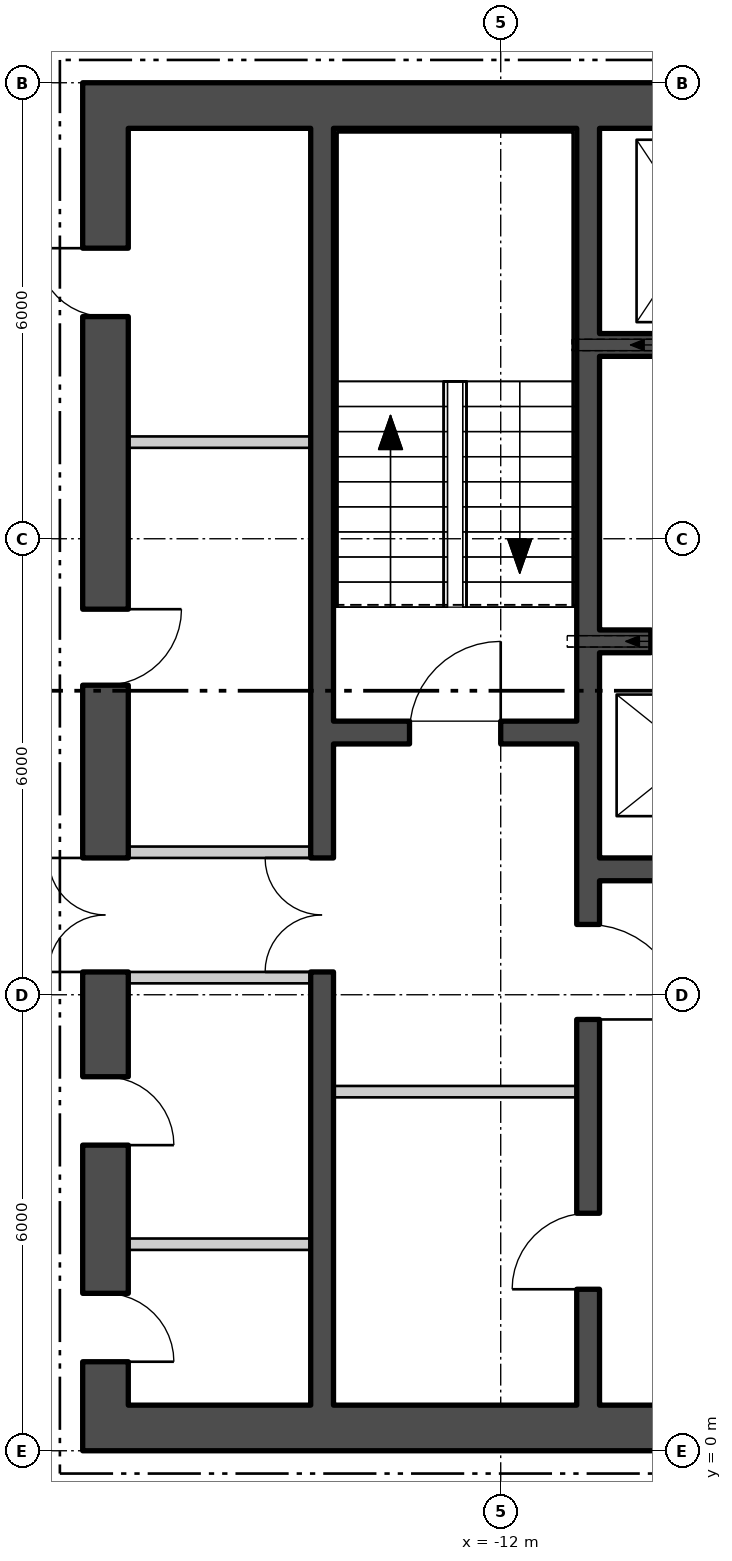
"""IFC4 building model, lengths in metres.
Left out: names, types, materials, properties, quantities, classifications, styles, units other than length and angle.
Written with IfcOpenShell. Run it as: python <this file> out.ifc"""

import sys

from ifc_helpers import new_model, si_unit, direction, frame, frame_2d, origin, place, context, subcontext, project, spatial, polyline, rectangle, outline, extrude, element, fill, save


model = new_model("IFC4")
c1 = context("Model", 3, precision=1e-05, world=origin(), true_north=direction((0.0, 1.0)))
c2 = subcontext(c1, "Body", "Model", "MODEL_VIEW")
j1 = project(units=[si_unit("LENGTHUNIT", "METRE"), si_unit("PLANEANGLEUNIT", "RADIAN")], contexts=[c1])
p1 = place(None, origin())
s1 = spatial("IfcSite", under=j1, at=p1, CompositionType="ELEMENT")
p2 = place(p1, origin())
s2 = spatial("IfcBuilding", under=s1, at=p2, CompositionType="ELEMENT")
p3 = place(p2, frame((0.0, 0.0, 78.3)))
s3 = spatial("IfcBuildingStorey", under=s2, at=p3, CompositionType="ELEMENT", Elevation=78.3)
p4 = place(p3, frame((-28.09, 10.934, -0.18), z_axis=(0.0, 0.0, 1.0), x_axis=(0.500000711659, -0.866024992908, 0.0)))
e1 = element("IfcWall", 1, at=p4, inside=s3, PredefinedType="SOLIDWALL", context=c2, shape_type="SweptSolid", body=[
    extrude(outline(polyline([(-0.13, -0.225), (45.87, -0.225), (45.61, 0.225), (0.13, 0.225), (-0.13, -0.225)])), origin(), (0.0, 0.0, 1.0), 6.0),
])
p5 = place(p4, frame((1.424, 0.0, 1.38)))
e2 = element("IfcOpeningElement", 2, at=p5, cuts=e1, PredefinedType="OPENING", context=c2, shape_type="SweptSolid", body=[
    extrude(rectangle(XDim=2.4, YDim=3.6, at=frame_2d((1.2, 1.8))), frame((0.0, 0.235, 0.0), z_axis=(0.0, -1.0, 0.0), x_axis=(1.0, 0.0, 0.0)), (0.0, 0.0, 1.0), 0.47),
])
p6 = place(p4, frame((5.893, 0.0, 1.38)))
e3 = element("IfcOpeningElement", 3, at=p6, cuts=e1, PredefinedType="OPENING", context=c2, shape_type="SweptSolid", body=[
    extrude(rectangle(XDim=2.4, YDim=3.6, at=frame_2d((1.2, 1.8))), frame((0.0, 0.235, 0.0), z_axis=(0.0, -1.0, 0.0), x_axis=(1.0, 0.0, 0.0)), (0.0, 0.0, 1.0), 0.47),
])
p7 = place(p4, frame((10.401, 0.0, 1.38)))
e4 = element("IfcOpeningElement", 4, at=p7, cuts=e1, PredefinedType="OPENING", context=c2, shape_type="SweptSolid", body=[
    extrude(rectangle(XDim=2.4, YDim=3.6, at=frame_2d((1.2, 1.8))), frame((0.0, 0.235, 0.0), z_axis=(0.0, -1.0, 0.0), x_axis=(1.0, 0.0, 0.0)), (0.0, 0.0, 1.0), 0.47),
])
p8 = place(p4, frame((14.909, 0.0, 1.38)))
e5 = element("IfcOpeningElement", 5, at=p8, cuts=e1, PredefinedType="OPENING", context=c2, shape_type="SweptSolid", body=[
    extrude(rectangle(XDim=2.4, YDim=3.6, at=frame_2d((1.2, 1.8))), frame((0.0, 0.235, 0.0), z_axis=(0.0, -1.0, 0.0), x_axis=(1.0, 0.0, 0.0)), (0.0, 0.0, 1.0), 0.47),
])
p9 = place(p4, frame((19.416, 0.0, 1.38)))
e6 = element("IfcOpeningElement", 6, at=p9, cuts=e1, PredefinedType="OPENING", context=c2, shape_type="SweptSolid", body=[
    extrude(rectangle(XDim=2.4, YDim=3.6, at=frame_2d((1.2, 1.8))), frame((0.0, 0.235, 0.0), z_axis=(0.0, -1.0, 0.0), x_axis=(1.0, 0.0, 0.0)), (0.0, 0.0, 1.0), 0.47),
])
p10 = place(p4, frame((23.924, 0.0, 1.38)))
e7 = element("IfcOpeningElement", 7, at=p10, cuts=e1, PredefinedType="OPENING", context=c2, shape_type="SweptSolid", body=[
    extrude(rectangle(XDim=2.4, YDim=3.6, at=frame_2d((1.2, 1.8))), frame((0.0, 0.235, 0.0), z_axis=(0.0, -1.0, 0.0), x_axis=(1.0, 0.0, 0.0)), (0.0, 0.0, 1.0), 0.47),
])
p11 = place(p4, frame((28.431, 0.0, 1.38)))
e8 = element("IfcOpeningElement", 8, at=p11, cuts=e1, PredefinedType="OPENING", context=c2, shape_type="SweptSolid", body=[
    extrude(rectangle(XDim=2.4, YDim=3.6, at=frame_2d((1.2, 1.8))), frame((0.0, 0.235, 0.0), z_axis=(0.0, -1.0, 0.0), x_axis=(1.0, 0.0, 0.0)), (0.0, 0.0, 1.0), 0.47),
])
p12 = place(p4, frame((32.939, 0.0, 1.38)))
e9 = element("IfcOpeningElement", 9, at=p12, cuts=e1, PredefinedType="OPENING", context=c2, shape_type="SweptSolid", body=[
    extrude(rectangle(XDim=2.4, YDim=3.6, at=frame_2d((1.2, 1.8))), frame((0.0, 0.235, 0.0), z_axis=(0.0, -1.0, 0.0), x_axis=(1.0, 0.0, 0.0)), (0.0, 0.0, 1.0), 0.47),
])
p13 = place(p4, frame((37.447, 0.0, 1.38)))
e10 = element("IfcOpeningElement", 10, at=p13, cuts=e1, PredefinedType="OPENING", context=c2, shape_type="SweptSolid", body=[
    extrude(rectangle(XDim=2.4, YDim=3.6, at=frame_2d((1.2, 1.8))), frame((0.0, 0.235, 0.0), z_axis=(0.0, -1.0, 0.0), x_axis=(1.0, 0.0, 0.0)), (0.0, 0.0, 1.0), 0.47),
])
p14 = place(p4, frame((41.916, 0.0, 1.38)))
e11 = element("IfcOpeningElement", 11, at=p14, cuts=e1, PredefinedType="OPENING", context=c2, shape_type="SweptSolid", body=[
    extrude(rectangle(XDim=2.4, YDim=3.6, at=frame_2d((1.2, 1.8))), frame((0.0, 0.235, 0.0), z_axis=(0.0, -1.0, 0.0), x_axis=(1.0, 0.0, 0.0)), (0.0, 0.0, 1.0), 0.47),
])
p15 = place(p3, frame((-17.5, 0.3, 0.0), z_axis=(0.0, 0.0, 1.0), x_axis=(1.0, 0.0, 0.0)))
e12 = element("IfcWall", 12, at=p15, inside=s3, PredefinedType="SHEAR", context=c2, shape_type="SweptSolid", body=[
    extrude(rectangle(XDim=35.0, YDim=0.6, at=frame_2d((17.5, 0.0))), origin(), (0.0, 0.0, 1.0), 5.8),
])
p16 = place(p15, frame((12.0, 0.0, 0.0)))
e13 = element("IfcOpeningElement", 13, at=p16, cuts=e12, PredefinedType="OPENING", context=c2, shape_type="SweptSolid", body=[
    extrude(rectangle(XDim=1.8, YDim=2.4, at=frame_2d((0.9, 1.2))), frame((0.0, 0.31, 0.0), z_axis=(0.0, -1.0, 0.0), x_axis=(1.0, 0.0, 0.0)), (0.0, 0.0, 1.0), 0.62),
])
p17 = place(p15, frame((22.0, 0.0, 0.0)))
e14 = element("IfcOpeningElement", 14, at=p17, cuts=e12, PredefinedType="OPENING", context=c2, shape_type="SweptSolid", body=[
    extrude(rectangle(XDim=1.8, YDim=2.4, at=frame_2d((0.9, 1.2))), frame((0.0, 0.31, 0.0), z_axis=(0.0, -1.0, 0.0), x_axis=(1.0, 0.0, 0.0)), (0.0, 0.0, 1.0), 0.62),
])
p18 = place(p3, frame((-17.5, 17.7, 0.0), z_axis=(0.0, 0.0, 1.0), x_axis=(1.0, 0.0, 0.0)))
e15 = element("IfcWall", 15, at=p18, inside=s3, PredefinedType="SHEAR", context=c2, shape_type="SweptSolid", body=[
    extrude(rectangle(XDim=35.0, YDim=0.6, at=frame_2d((17.5, 0.0))), origin(), (0.0, 0.0, 1.0), 5.8),
])
p19 = place(p3, frame((-17.2, 0.6, 0.0), z_axis=(0.0, 0.0, 1.0), x_axis=(0.0, 1.0, 0.0)))
e16 = element("IfcWall", 16, at=p19, inside=s3, PredefinedType="SHEAR", context=c2, shape_type="SweptSolid", body=[
    extrude(rectangle(XDim=16.8, YDim=0.6, at=frame_2d((8.4, 0.0))), origin(), (0.0, 0.0, 1.0), 5.8),
])
p20 = place(p19, frame((5.7, 0.0, 0.0)))
e17 = element("IfcOpeningElement", 17, at=p20, cuts=e16, PredefinedType="OPENING", context=c2, shape_type="SweptSolid", body=[
    extrude(rectangle(XDim=1.5, YDim=2.1, at=frame_2d((0.75, 1.05))), frame((0.0, 0.31, 0.0), z_axis=(0.0, -1.0, 0.0), x_axis=(1.0, 0.0, 0.0)), (0.0, 0.0, 1.0), 0.62),
])
p21 = place(p19, frame((0.571, 0.0, 0.0)))
e18 = element("IfcOpeningElement", 18, at=p21, cuts=e16, PredefinedType="OPENING", context=c2, shape_type="SweptSolid", body=[
    extrude(rectangle(XDim=0.9, YDim=2.1, at=frame_2d((0.45, 1.05))), frame((0.0, 0.31, 0.0), z_axis=(0.0, -1.0, 0.0), x_axis=(1.0, 0.0, 0.0)), (0.0, 0.0, 1.0), 0.62),
])
p22 = place(p19, frame((3.421, 0.0, 0.0)))
e19 = element("IfcOpeningElement", 19, at=p22, cuts=e16, PredefinedType="OPENING", context=c2, shape_type="SweptSolid", body=[
    extrude(rectangle(XDim=0.9, YDim=2.1, at=frame_2d((0.45, 1.05))), frame((0.0, 0.31, 0.0), z_axis=(0.0, -1.0, 0.0), x_axis=(1.0, 0.0, 0.0)), (0.0, 0.0, 1.0), 0.62),
])
p23 = place(p19, frame((9.473, 0.0, 0.0)))
e20 = element("IfcOpeningElement", 20, at=p23, cuts=e16, PredefinedType="OPENING", context=c2, shape_type="SweptSolid", body=[
    extrude(rectangle(XDim=1.0, YDim=2.1, at=frame_2d((0.5, 1.05))), frame((0.0, 0.31, 0.0), z_axis=(0.0, -1.0, 0.0), x_axis=(1.0, 0.0, 0.0)), (0.0, 0.0, 1.0), 0.62),
])
p24 = place(p19, frame((14.323, 0.0, 0.0)))
e21 = element("IfcOpeningElement", 21, at=p24, cuts=e16, PredefinedType="OPENING", context=c2, shape_type="SweptSolid", body=[
    extrude(rectangle(XDim=0.9, YDim=2.1, at=frame_2d((0.45, 1.05))), frame((0.0, 0.31, 0.0), z_axis=(0.0, -1.0, 0.0), x_axis=(1.0, 0.0, 0.0)), (0.0, 0.0, 1.0), 0.62),
])
p25 = place(p3, frame((-10.85, 0.6, 0.0), z_axis=(0.0, 0.0, 1.0), x_axis=(0.0, 1.0, 0.0)))
e22 = element("IfcWall", 22, at=p25, inside=s3, PredefinedType="SHEAR", context=c2, shape_type="SweptSolid", body=[
    extrude(rectangle(XDim=16.8, YDim=0.3, at=frame_2d((8.4, 0.0))), origin(), (0.0, 0.0, 1.0), 5.8),
])
p26 = place(p25, frame((5.075, 0.0, 0.0)))
e23 = element("IfcOpeningElement", 23, at=p26, cuts=e22, PredefinedType="OPENING", context=c2, shape_type="SweptSolid", body=[
    extrude(rectangle(XDim=1.25, YDim=2.1, at=frame_2d((0.625, 1.05))), frame((0.0, 0.16, 0.0), z_axis=(0.0, -1.0, 0.0), x_axis=(1.0, 0.0, 0.0)), (0.0, 0.0, 1.0), 0.32),
])
p27 = place(p25, frame((1.525, 0.0, 0.0)))
e24 = element("IfcOpeningElement", 24, at=p27, cuts=e22, PredefinedType="OPENING", context=c2, shape_type="SweptSolid", body=[
    extrude(rectangle(XDim=1.0, YDim=2.1, at=frame_2d((0.5, 1.05))), frame((0.0, 0.16, 0.0), z_axis=(0.0, -1.0, 0.0), x_axis=(1.0, 0.0, 0.0)), (0.0, 0.0, 1.0), 0.32),
])
p28 = place(p3, frame((-14.35, 0.6, 0.0), z_axis=(0.0, 0.0, 1.0), x_axis=(0.0, 1.0, 0.0)))
e25 = element("IfcWall", 25, at=p28, inside=s3, PredefinedType="SHEAR", context=c2, shape_type="SweptSolid", body=[
    extrude(rectangle(XDim=16.8, YDim=0.3, at=frame_2d((8.4, 0.0))), origin(), (0.0, 0.0, 1.0), 5.8),
])
p29 = place(p28, frame((5.7, 0.0, 0.0)))
e26 = element("IfcOpeningElement", 26, at=p29, cuts=e25, PredefinedType="OPENING", context=c2, shape_type="SweptSolid", body=[
    extrude(rectangle(XDim=1.5, YDim=2.1, at=frame_2d((0.75, 1.05))), frame((0.0, 0.16, 0.0), z_axis=(0.0, -1.0, 0.0), x_axis=(1.0, 0.0, 0.0)), (0.0, 0.0, 1.0), 0.32),
])
p30 = place(p3, frame((-14.2, 9.45, 0.0), z_axis=(0.0, 0.0, 1.0), x_axis=(1.0, 0.0, 0.0)))
e27 = element("IfcWall", 27, at=p30, inside=s3, PredefinedType="SHEAR", context=c2, shape_type="SweptSolid", body=[
    extrude(rectangle(XDim=3.2, YDim=0.3, at=frame_2d((1.6, 0.0))), origin(), (0.0, 0.0, 1.0), 5.8),
])
p31 = place(p30, frame((1.0, 0.0, 0.0)))
e28 = element("IfcOpeningElement", 28, at=p31, cuts=e27, PredefinedType="OPENING", context=c2, shape_type="SweptSolid", body=[
    extrude(rectangle(XDim=1.2, YDim=2.1, at=frame_2d((0.6, 1.05))), frame((0.0, 0.16, 0.0), z_axis=(0.0, -1.0, 0.0), x_axis=(1.0, 0.0, 0.0)), (0.0, 0.0, 1.0), 0.32),
])
p32 = place(p3, frame((-10.7, 14.55, 0.0), z_axis=(0.0, 0.0, 1.0), x_axis=(1.0, 0.0, 0.0)))
e29 = element("IfcWall", 29, at=p32, inside=s3, PredefinedType="SHEAR", context=c2, shape_type="SweptSolid", body=[
    extrude(rectangle(XDim=21.4, YDim=0.3, at=frame_2d((10.7, 0.0))), origin(), (0.0, 0.0, 1.0), 5.8),
])
p33 = place(p32, frame((0.738, 0.0, 0.0)))
e30 = element("IfcOpeningElement", 30, at=p33, cuts=e29, PredefinedType="OPENING", context=c2, shape_type="SweptSolid", body=[
    extrude(rectangle(XDim=1.1, YDim=2.1, at=frame_2d((0.55, 1.05))), frame((0.0, 0.16, 0.0), z_axis=(0.0, -1.0, 0.0), x_axis=(1.0, 0.0, 0.0)), (0.0, 0.0, 1.0), 0.32),
])
p34 = place(p32, frame((3.462, 0.0, 0.0)))
e31 = element("IfcOpeningElement", 31, at=p34, cuts=e29, PredefinedType="OPENING", context=c2, shape_type="SweptSolid", body=[
    extrude(rectangle(XDim=1.1, YDim=2.1, at=frame_2d((0.55, 1.05))), frame((0.0, 0.16, 0.0), z_axis=(0.0, -1.0, 0.0), x_axis=(1.0, 0.0, 0.0)), (0.0, 0.0, 1.0), 0.32),
])
p35 = place(p32, frame((6.138, 0.0, 0.0)))
e32 = element("IfcOpeningElement", 32, at=p35, cuts=e29, PredefinedType="OPENING", context=c2, shape_type="SweptSolid", body=[
    extrude(rectangle(XDim=1.1, YDim=2.1, at=frame_2d((0.55, 1.05))), frame((0.0, 0.16, 0.0), z_axis=(0.0, -1.0, 0.0), x_axis=(1.0, 0.0, 0.0)), (0.0, 0.0, 1.0), 0.32),
])
p36 = place(p32, frame((8.812, 0.0, 0.0)))
e33 = element("IfcOpeningElement", 33, at=p36, cuts=e29, PredefinedType="OPENING", context=c2, shape_type="SweptSolid", body=[
    extrude(rectangle(XDim=1.1, YDim=2.1, at=frame_2d((0.55, 1.05))), frame((0.0, 0.16, 0.0), z_axis=(0.0, -1.0, 0.0), x_axis=(1.0, 0.0, 0.0)), (0.0, 0.0, 1.0), 0.32),
])
p37 = place(p32, frame((14.162, 0.0, 0.0)))
e34 = element("IfcOpeningElement", 34, at=p37, cuts=e29, PredefinedType="OPENING", context=c2, shape_type="SweptSolid", body=[
    extrude(rectangle(XDim=1.1, YDim=2.1, at=frame_2d((0.55, 1.05))), frame((0.0, 0.16, 0.0), z_axis=(0.0, -1.0, 0.0), x_axis=(1.0, 0.0, 0.0)), (0.0, 0.0, 1.0), 0.32),
])
p38 = place(p32, frame((16.837, 0.0, 0.0)))
e35 = element("IfcOpeningElement", 35, at=p38, cuts=e29, PredefinedType="OPENING", context=c2, shape_type="SweptSolid", body=[
    extrude(rectangle(XDim=1.1, YDim=2.1, at=frame_2d((0.55, 1.05))), frame((0.0, 0.16, 0.0), z_axis=(0.0, -1.0, 0.0), x_axis=(1.0, 0.0, 0.0)), (0.0, 0.0, 1.0), 0.32),
])
p39 = place(p32, frame((19.562, 0.0, 0.0)))
e36 = element("IfcOpeningElement", 36, at=p39, cuts=e29, PredefinedType="OPENING", context=c2, shape_type="SweptSolid", body=[
    extrude(rectangle(XDim=1.1, YDim=2.1, at=frame_2d((0.55, 1.05))), frame((0.0, 0.16, 0.0), z_axis=(0.0, -1.0, 0.0), x_axis=(1.0, 0.0, 0.0)), (0.0, 0.0, 1.0), 0.32),
])
p40 = place(p3, frame((-10.7, 10.65, 0.0), z_axis=(0.0, 0.0, 1.0), x_axis=(1.0, 0.0, 0.0)))
e37 = element("IfcWall", 37, at=p40, inside=s3, PredefinedType="SHEAR", context=c2, shape_type="SweptSolid", body=[
    extrude(rectangle(XDim=10.3, YDim=0.3, at=frame_2d((5.15, 0.0))), origin(), (0.0, 0.0, 1.0), 5.8),
])
p41 = place(p40, frame((0.675, 0.0, 0.0)))
e38 = element("IfcOpeningElement", 38, at=p41, cuts=e37, PredefinedType="OPENING", context=c2, shape_type="SweptSolid", body=[
    extrude(rectangle(XDim=1.1, YDim=2.1, at=frame_2d((0.55, 1.05))), frame((0.0, 0.16, 0.0), z_axis=(0.0, -1.0, 0.0), x_axis=(1.0, 0.0, 0.0)), (0.0, 0.0, 1.0), 0.32),
])
p42 = place(p40, frame((3.275, 0.0, 0.0)))
e39 = element("IfcOpeningElement", 39, at=p42, cuts=e37, PredefinedType="OPENING", context=c2, shape_type="SweptSolid", body=[
    extrude(rectangle(XDim=1.1, YDim=2.1, at=frame_2d((0.55, 1.05))), frame((0.0, 0.16, 0.0), z_axis=(0.0, -1.0, 0.0), x_axis=(1.0, 0.0, 0.0)), (0.0, 0.0, 1.0), 0.32),
])
p43 = place(p40, frame((5.825, 0.0, 0.0)))
e40 = element("IfcOpeningElement", 40, at=p43, cuts=e37, PredefinedType="OPENING", context=c2, shape_type="SweptSolid", body=[
    extrude(rectangle(XDim=1.1, YDim=2.1, at=frame_2d((0.55, 1.05))), frame((0.0, 0.16, 0.0), z_axis=(0.0, -1.0, 0.0), x_axis=(1.0, 0.0, 0.0)), (0.0, 0.0, 1.0), 0.32),
])
p44 = place(p40, frame((8.375, 0.0, 0.0)))
e41 = element("IfcOpeningElement", 41, at=p44, cuts=e37, PredefinedType="OPENING", context=c2, shape_type="SweptSolid", body=[
    extrude(rectangle(XDim=1.1, YDim=2.1, at=frame_2d((0.55, 1.05))), frame((0.0, 0.16, 0.0), z_axis=(0.0, -1.0, 0.0), x_axis=(1.0, 0.0, 0.0)), (0.0, 0.0, 1.0), 0.32),
])
p45 = place(p3, frame((-10.7, 7.65, 0.0), z_axis=(0.0, 0.0, 1.0), x_axis=(1.0, 0.0, 0.0)))
e42 = element("IfcWall", 42, at=p45, inside=s3, PredefinedType="SHEAR", context=c2, shape_type="SweptSolid", body=[
    extrude(rectangle(XDim=10.3, YDim=0.3, at=frame_2d((5.15, 0.0))), origin(), (0.0, 0.0, 1.0), 5.8),
])
p46 = place(p3, frame((-14.2, 4.725, 0.0), z_axis=(0.0, 0.0, 1.0), x_axis=(1.0, 0.0, 0.0)))
e43 = element("IfcWall", 43, at=p46, inside=s3, PredefinedType="PARTITIONING", context=c2, shape_type="SweptSolid", body=[
    extrude(rectangle(XDim=3.2, YDim=0.15, at=frame_2d((1.6, 0.0))), origin(), (0.0, 0.0, 1.0), 5.8),
])
for number, where, z_axis, x_axis in (
    (44, (-16.9, 6.225, 0.0), (0.0, 0.0, 1.0), (1.0, 0.0, 0.0)),
    (45, (-16.9, 7.875, 0.0), (0.0, 0.0, 1.0), (1.0, 0.0, 0.0)),
    (46, (-16.9, 2.718, 0.0), (0.0, 0.0, 1.0), (1.0, 0.0, 0.0)),
    (47, (-16.9, 13.271, 0.0), (0.0, 0.0, 1.0), (1.0, 0.0, 0.0)),
):
    element("IfcWall", number, at=place(p3, frame(where, z_axis=z_axis, x_axis=x_axis)), inside=s3, PredefinedType="PARTITIONING", context=c2, shape_type="SweptSolid", body=[
        extrude(rectangle(XDim=2.4, YDim=0.15, at=frame_2d((1.2, 0.0))), origin(), (0.0, 0.0, 1.0), 5.8),
    ])
p47 = place(p41, origin())
e48 = element("IfcDoor", 48, at=p47, inside=s3, OperationType="SLIDING_TO_LEFT", PredefinedType="DOOR", context=c2, shape_type="SweptSolid", body=[
    extrude(rectangle(XDim=1.1, YDim=2.1, at=frame_2d((0.55, 1.05))), frame((0.0, 0.025, 0.0), z_axis=(0.0, -1.0, 0.0), x_axis=(1.0, 0.0, 0.0)), (0.0, 0.0, 1.0), 0.05),
])
fill(e38, e48)
p48 = place(p31, origin())
e49 = element("IfcDoor", 49, at=p48, inside=s3, OperationType="SINGLE_SWING_LEFT", PredefinedType="DOOR", context=c2, shape_type="SweptSolid", body=[
    extrude(rectangle(XDim=1.2, YDim=2.1, at=frame_2d((0.6, 1.05))), frame((0.0, 0.025, 0.0), z_axis=(0.0, -1.0, 0.0), x_axis=(1.0, 0.0, 0.0)), (0.0, 0.0, 1.0), 0.05),
])
fill(e28, e49)
p49 = place(p26, origin())
e50 = element("IfcDoor", 50, at=p49, inside=s3, OperationType="SINGLE_SWING_LEFT", PredefinedType="DOOR", context=c2, shape_type="SweptSolid", body=[
    extrude(rectangle(XDim=1.25, YDim=2.1, at=frame_2d((0.625, 1.05))), frame((0.0, 0.025, 0.0), z_axis=(0.0, -1.0, 0.0), x_axis=(1.0, 0.0, 0.0)), (0.0, 0.0, 1.0), 0.05),
])
fill(e23, e50)
p50 = place(p27, origin())
e51 = element("IfcDoor", 51, at=p50, inside=s3, OperationType="SINGLE_SWING_RIGHT", PredefinedType="DOOR", context=c2, shape_type="SweptSolid", body=[
    extrude(rectangle(XDim=1.0, YDim=2.1, at=frame_2d((0.5, 1.05))), frame((0.0, 0.025, 0.0), z_axis=(0.0, -1.0, 0.0), x_axis=(1.0, 0.0, 0.0)), (0.0, 0.0, 1.0), 0.05),
])
fill(e24, e51)
p51 = place(p29, origin())
e52 = element("IfcDoor", 52, at=p51, inside=s3, OperationType="DOUBLE_DOOR_SINGLE_SWING", PredefinedType="DOOR", context=c2, shape_type="SweptSolid", body=[
    extrude(rectangle(XDim=1.5, YDim=2.1, at=frame_2d((0.75, 1.05))), frame((0.0, 0.025, 0.0), z_axis=(0.0, -1.0, 0.0), x_axis=(1.0, 0.0, 0.0)), (0.0, 0.0, 1.0), 0.05),
])
fill(e26, e52)
p52 = place(p20, origin())
e53 = element("IfcDoor", 53, at=p52, inside=s3, OperationType="DOUBLE_DOOR_SINGLE_SWING", PredefinedType="DOOR", context=c2, shape_type="SweptSolid", body=[
    extrude(rectangle(XDim=1.5, YDim=2.1, at=frame_2d((0.75, 1.05))), frame((0.0, 0.025, 0.0), z_axis=(0.0, -1.0, 0.0), x_axis=(1.0, 0.0, 0.0)), (0.0, 0.0, 1.0), 0.05),
])
fill(e17, e53)
p53 = place(p21, origin())
e54 = element("IfcDoor", 54, at=p53, inside=s3, OperationType="SINGLE_SWING_LEFT", PredefinedType="DOOR", context=c2, shape_type="SweptSolid", body=[
    extrude(rectangle(XDim=0.9, YDim=2.1, at=frame_2d((0.45, 1.05))), frame((0.0, 0.025, 0.0), z_axis=(0.0, -1.0, 0.0), x_axis=(1.0, 0.0, 0.0)), (0.0, 0.0, 1.0), 0.05),
])
fill(e18, e54)
p54 = place(p22, origin())
e55 = element("IfcDoor", 55, at=p54, inside=s3, OperationType="SINGLE_SWING_LEFT", PredefinedType="DOOR", context=c2, shape_type="SweptSolid", body=[
    extrude(rectangle(XDim=0.9, YDim=2.1, at=frame_2d((0.45, 1.05))), frame((0.0, 0.025, 0.0), z_axis=(0.0, -1.0, 0.0), x_axis=(1.0, 0.0, 0.0)), (0.0, 0.0, 1.0), 0.05),
])
fill(e19, e55)
p55 = place(p23, origin())
e56 = element("IfcDoor", 56, at=p55, inside=s3, OperationType="SINGLE_SWING_RIGHT", PredefinedType="DOOR", context=c2, shape_type="SweptSolid", body=[
    extrude(rectangle(XDim=1.0, YDim=2.1, at=frame_2d((0.5, 1.05))), frame((0.0, 0.025, 0.0), z_axis=(0.0, -1.0, 0.0), x_axis=(1.0, 0.0, 0.0)), (0.0, 0.0, 1.0), 0.05),
])
fill(e20, e56)
p56 = place(p24, origin())
e57 = element("IfcDoor", 57, at=p56, inside=s3, OperationType="SINGLE_SWING_LEFT", PredefinedType="DOOR", context=c2, shape_type="SweptSolid", body=[
    extrude(rectangle(XDim=0.9, YDim=2.1, at=frame_2d((0.45, 1.05))), frame((0.0, 0.025, 0.0), z_axis=(0.0, -1.0, 0.0), x_axis=(1.0, 0.0, 0.0)), (0.0, 0.0, 1.0), 0.05),
])
fill(e21, e57)
save(model, sys.argv[1])
